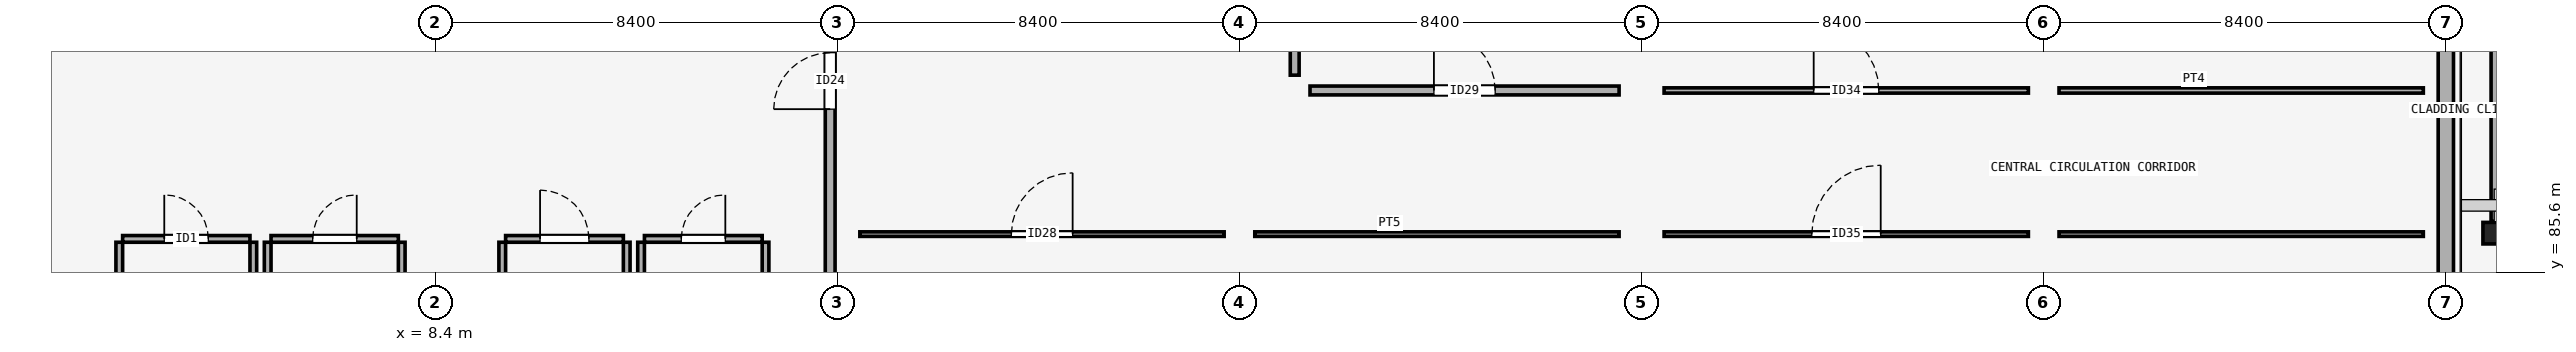
"""IFC4 building model, lengths in metres.
Left out: names, types, materials, properties, quantities, classifications, styles, units other than length and angle.
Written with IfcOpenShell. Run it as: python <this file> out.ifc"""

import sys

from ifc_helpers import new_model, si_unit, direction, frame, frame_2d, origin, origin_2d, place, context, subcontext, project, spatial, rectangle, extrude, element, fill, save


model = new_model("IFC4")
c1 = context("Model", 3, precision=1e-05, world=origin(), true_north=direction((0.0, 1.0)))
c2 = subcontext(c1, "Body", "Model", "MODEL_VIEW")
j1 = project(units=[si_unit("LENGTHUNIT", "METRE"), si_unit("PLANEANGLEUNIT", "RADIAN")], contexts=[c1])
p1 = place(None, origin())
s1 = spatial("IfcSite", under=j1, at=p1, CompositionType="ELEMENT")
p2 = place(p1, origin())
s2 = spatial("IfcBuilding", under=s1, at=p2, CompositionType="ELEMENT")
p3 = place(p2, origin())
s3 = spatial("IfcBuildingStorey", under=s2, at=p3, CompositionType="ELEMENT", Elevation=0.0)
p4 = place(p3, frame((51.45, 86.42, 0.0), z_axis=(0.0, 0.0, 1.0), x_axis=(0.0, 1.0, 0.0)))
e1 = element("IfcColumn", 1, at=p4, inside=s3, PredefinedType="PILASTER", context=c2, shape_type="SweptSolid", body=[
    extrude(rectangle(XDim=0.45, YDim=0.55, at=origin_2d()), origin(), (0.0, 0.0, 1.0), 5.4),
])
p5 = place(p3, frame((50.4, 85.225, 0.0), z_axis=(0.0, 0.0, 1.0), x_axis=(0.0, 1.0, 0.0)))
e2 = element("IfcWall", 2, at=p5, inside=s3, PredefinedType="SOLIDWALL", context=c2, shape_type="SweptSolid", body=[
    extrude(rectangle(XDim=7.55, YDim=0.32, at=frame_2d((3.775, 0.0))), origin(), (0.0, 0.0, 1.0), 4.35),
])
p6 = place(p3, frame((51.45, 86.67, 4.78), z_axis=(0.0, 0.0, 1.0), x_axis=(0.0, 1.0, 0.0)))
e3 = element("IfcWall", 3, at=p6, inside=s3, PredefinedType="PARAPET", context=c2, shape_type="SweptSolid", body=[
    extrude(rectangle(XDim=4.66, YDim=0.21, at=frame_2d((2.33, 0.0))), origin(), (0.0, 0.0, 1.0), 0.12),
])
p7 = place(p3, frame((1.87, 86.3, 0.0), z_axis=(0.0, 0.0, 1.0), x_axis=(1.0, 0.0, 0.0)))
e4 = element("IfcWall", 4, at=p7, inside=s3, PredefinedType="PARTITIONING", context=c2, shape_type="SweptSolid", body=[
    extrude(rectangle(XDim=2.66, YDim=0.14, at=frame_2d((1.33, 0.0))), origin(), (0.0, 0.0, 1.0), 5.1),
])
p8 = place(p7, frame((0.87, 0.0, 0.0)))
e5 = element("IfcOpeningElement", 5, at=p8, cuts=e4, PredefinedType="OPENING", context=c2, shape_type="SweptSolid", body=[
    extrude(rectangle(XDim=0.92, YDim=2.12, at=frame_2d((0.46, 1.06))), frame((0.0, 0.08, 0.0), z_axis=(0.0, -1.0, 0.0), x_axis=(1.0, 0.0, 0.0)), (0.0, 0.0, 1.0), 0.16),
])
for number, where, z_axis, x_axis in (
    (6, (1.8, 83.87, 0.0), (0.0, 0.0, 1.0), (0.0, 1.0, 0.0)),
    (7, (4.6, 83.87, 0.0), (0.0, 0.0, 1.0), (0.0, 1.0, 0.0)),
):
    element("IfcWall", number, at=place(p3, frame(where, z_axis=z_axis, x_axis=x_axis)), inside=s3, PredefinedType="PARTITIONING", context=c2, shape_type="SweptSolid", body=[
        extrude(rectangle(XDim=2.36, YDim=0.14, at=frame_2d((1.18, 0.0))), origin(), (0.0, 0.0, 1.0), 4.35),
    ])
p9 = place(p3, frame((4.97, 86.3, 0.0), z_axis=(0.0, 0.0, 1.0), x_axis=(1.0, 0.0, 0.0)))
e8 = element("IfcWall", 8, at=p9, inside=s3, PredefinedType="PARTITIONING", context=c2, shape_type="SweptSolid", body=[
    extrude(rectangle(XDim=2.66, YDim=0.14, at=frame_2d((1.33, 0.0))), origin(), (0.0, 0.0, 1.0), 5.1),
])
p10 = place(p9, frame((0.87, 0.0, 0.0)))
e9 = element("IfcOpeningElement", 9, at=p10, cuts=e8, PredefinedType="OPENING", context=c2, shape_type="SweptSolid", body=[
    extrude(rectangle(XDim=0.92, YDim=2.12, at=frame_2d((0.46, 1.06))), frame((0.0, 0.08, 0.0), z_axis=(0.0, -1.0, 0.0), x_axis=(1.0, 0.0, 0.0)), (0.0, 0.0, 1.0), 0.16),
])
for number, where, z_axis, x_axis in (
    (10, (4.9, 83.87, 0.0), (0.0, 0.0, 1.0), (0.0, 1.0, 0.0)),
    (11, (7.7, 83.87, 0.0), (0.0, 0.0, 1.0), (0.0, 1.0, 0.0)),
):
    element("IfcWall", number, at=place(p3, frame(where, z_axis=z_axis, x_axis=x_axis)), inside=s3, PredefinedType="PARTITIONING", context=c2, shape_type="SweptSolid", body=[
        extrude(rectangle(XDim=2.36, YDim=0.14, at=frame_2d((1.18, 0.0))), origin(), (0.0, 0.0, 1.0), 4.35),
    ])
p11 = place(p3, frame((9.87, 86.3, 0.0), z_axis=(0.0, 0.0, 1.0), x_axis=(1.0, 0.0, 0.0)))
e12 = element("IfcWall", 12, at=p11, inside=s3, PredefinedType="PARTITIONING", context=c2, shape_type="SweptSolid", body=[
    extrude(rectangle(XDim=2.46, YDim=0.14, at=frame_2d((1.23, 0.0))), origin(), (0.0, 0.0, 1.0), 5.1),
])
p12 = place(p11, frame((0.72, 0.0, 0.0)))
e13 = element("IfcOpeningElement", 13, at=p12, cuts=e12, PredefinedType="OPENING", context=c2, shape_type="SweptSolid", body=[
    extrude(rectangle(XDim=1.02, YDim=2.15, at=frame_2d((0.51, 1.075))), frame((0.0, 0.08, 0.0), z_axis=(0.0, -1.0, 0.0), x_axis=(1.0, 0.0, 0.0)), (0.0, 0.0, 1.0), 0.16),
])
for number, where, z_axis, x_axis in (
    (14, (9.8, 83.87, 0.0), (0.0, 0.0, 1.0), (0.0, 1.0, 0.0)),
    (15, (12.4, 83.87, 0.0), (0.0, 0.0, 1.0), (0.0, 1.0, 0.0)),
):
    element("IfcWall", number, at=place(p3, frame(where, z_axis=z_axis, x_axis=x_axis)), inside=s3, PredefinedType="PARTITIONING", context=c2, shape_type="SweptSolid", body=[
        extrude(rectangle(XDim=2.36, YDim=0.14, at=frame_2d((1.18, 0.0))), origin(), (0.0, 0.0, 1.0), 4.35),
    ])
p13 = place(p3, frame((12.77, 86.3, 0.0), z_axis=(0.0, 0.0, 1.0), x_axis=(1.0, 0.0, 0.0)))
e16 = element("IfcWall", 16, at=p13, inside=s3, PredefinedType="PARTITIONING", context=c2, shape_type="SweptSolid", body=[
    extrude(rectangle(XDim=2.46, YDim=0.14, at=frame_2d((1.23, 0.0))), origin(), (0.0, 0.0, 1.0), 5.1),
])
p14 = place(p13, frame((0.77, 0.0, 0.0)))
e17 = element("IfcOpeningElement", 17, at=p14, cuts=e16, PredefinedType="OPENING", context=c2, shape_type="SweptSolid", body=[
    extrude(rectangle(XDim=0.92, YDim=2.12, at=frame_2d((0.46, 1.06))), frame((0.0, 0.08, 0.0), z_axis=(0.0, -1.0, 0.0), x_axis=(1.0, 0.0, 0.0)), (0.0, 0.0, 1.0), 0.16),
])
for number, where, z_axis, x_axis in (
    (18, (12.7, 83.87, 0.0), (0.0, 0.0, 1.0), (0.0, 1.0, 0.0)),
    (19, (15.3, 83.87, 0.0), (0.0, 0.0, 1.0), (0.0, 1.0, 0.0)),
):
    element("IfcWall", number, at=place(p3, frame(where, z_axis=z_axis, x_axis=x_axis)), inside=s3, PredefinedType="PARTITIONING", context=c2, shape_type="SweptSolid", body=[
        extrude(rectangle(XDim=2.36, YDim=0.14, at=frame_2d((1.18, 0.0))), origin(), (0.0, 0.0, 1.0), 4.35),
    ])
p15 = place(p3, frame((16.65, 83.67, 0.0), z_axis=(0.0, 0.0, 1.0), x_axis=(0.0, 1.0, 0.0)))
e20 = element("IfcWall", 20, at=p15, inside=s3, PredefinedType="PARTITIONING", context=c2, shape_type="SweptSolid", body=[
    extrude(rectangle(XDim=11.86, YDim=0.205, at=frame_2d((5.93, 0.0))), origin(), (0.0, 0.0, 1.0), 4.35),
])
p16 = place(p15, frame((5.34, 0.0, 0.0)))
e21 = element("IfcOpeningElement", 21, at=p16, cuts=e20, PredefinedType="OPENING", context=c2, shape_type="SweptSolid", body=[
    extrude(rectangle(XDim=1.18, YDim=2.22, at=frame_2d((0.59, 1.11))), frame((0.0, 0.113, 0.0), z_axis=(0.0, -1.0, 0.0), x_axis=(1.0, 0.0, 0.0)), (0.0, 0.0, 1.0), 0.225),
])
p17 = place(p3, frame((17.27, 86.4, 0.0), z_axis=(0.0, 0.0, 1.0), x_axis=(1.0, 0.0, 0.0)))
e22 = element("IfcWall", 22, at=p17, inside=s3, PredefinedType="PARTITIONING", context=c2, shape_type="SweptSolid", body=[
    extrude(rectangle(XDim=7.61, YDim=0.095, at=frame_2d((3.805, 0.0))), origin(), (0.0, 0.0, 1.0), 5.1),
])
p18 = place(p17, frame((3.165, 0.0, 0.0)))
e23 = element("IfcOpeningElement", 23, at=p18, cuts=e22, PredefinedType="OPENING", context=c2, shape_type="SweptSolid", body=[
    extrude(rectangle(XDim=1.28, YDim=2.22, at=frame_2d((0.64, 1.11))), frame((0.0, 0.057, 0.0), z_axis=(0.0, -1.0, 0.0), x_axis=(1.0, 0.0, 0.0)), (0.0, 0.0, 1.0), 0.115),
])
p19 = place(p3, frame((25.52, 86.4, 0.0), z_axis=(0.0, 0.0, 1.0), x_axis=(1.0, 0.0, 0.0)))
e24 = element("IfcWall", 24, at=p19, inside=s3, PredefinedType="PARTITIONING", context=c2, shape_type="SweptSolid", body=[
    extrude(rectangle(XDim=7.61, YDim=0.095, at=frame_2d((3.805, 0.0))), origin(), (0.0, 0.0, 1.0), 5.1),
])
p20 = place(p3, frame((26.674, 89.4, 0.0), z_axis=(0.0, 0.0, 1.0), x_axis=(1.0, 0.0, 0.0)))
e25 = element("IfcWall", 25, at=p20, inside=s3, PredefinedType="PARTITIONING", context=c2, shape_type="SweptSolid", body=[
    extrude(rectangle(XDim=6.456, YDim=0.185, at=frame_2d((3.228, 0.0))), origin(), (0.0, 0.0, 1.0), 5.1),
])
p21 = place(p20, frame((2.588, 0.0, 0.0)))
e26 = element("IfcOpeningElement", 26, at=p21, cuts=e25, PredefinedType="OPENING", context=c2, shape_type="SweptSolid", body=[
    extrude(rectangle(XDim=1.28, YDim=2.34, at=frame_2d((0.64, 1.17))), frame((0.0, 0.103, 0.0), z_axis=(0.0, -1.0, 0.0), x_axis=(1.0, 0.0, 0.0)), (0.0, 0.0, 1.0), 0.205),
])
p22 = place(p3, frame((26.354, 89.72, 0.0), z_axis=(0.0, 0.0, 1.0), x_axis=(0.0, 1.0, 0.0)))
e27 = element("IfcWall", 27, at=p22, inside=s3, PredefinedType="PARTITIONING", context=c2, shape_type="SweptSolid", body=[
    extrude(rectangle(XDim=5.81, YDim=0.185, at=frame_2d((2.905, 0.0))), origin(), (0.0, 0.0, 1.0), 4.4),
])
p23 = place(p3, frame((34.07, 89.4, 0.0), z_axis=(0.0, 0.0, 1.0), x_axis=(1.0, 0.0, 0.0)))
e28 = element("IfcWall", 28, at=p23, inside=s3, PredefinedType="PARTITIONING", context=c2, shape_type="SweptSolid", body=[
    extrude(rectangle(XDim=7.61, YDim=0.11, at=frame_2d((3.805, 0.0))), origin(), (0.0, 0.0, 1.0), 5.1),
])
p24 = place(p23, frame((3.125, 0.0, 0.0)))
e29 = element("IfcOpeningElement", 29, at=p24, cuts=e28, PredefinedType="OPENING", context=c2, shape_type="SweptSolid", body=[
    extrude(rectangle(XDim=1.36, YDim=2.46, at=frame_2d((0.68, 1.23))), frame((0.0, 0.065, 0.0), z_axis=(0.0, -1.0, 0.0), x_axis=(1.0, 0.0, 0.0)), (0.0, 0.0, 1.0), 0.13),
])
p25 = place(p3, frame((42.32, 89.4, 0.0), z_axis=(0.0, 0.0, 1.0), x_axis=(1.0, 0.0, 0.0)))
e30 = element("IfcWall", 30, at=p25, inside=s3, PredefinedType="PARTITIONING", context=c2, shape_type="SweptSolid", body=[
    extrude(rectangle(XDim=7.61, YDim=0.11, at=frame_2d((3.805, 0.0))), origin(), (0.0, 0.0, 1.0), 5.1),
])
p26 = place(p3, frame((34.07, 86.4, 0.0), z_axis=(0.0, 0.0, 1.0), x_axis=(1.0, 0.0, 0.0)))
e31 = element("IfcWall", 31, at=p26, inside=s3, PredefinedType="PARTITIONING", context=c2, shape_type="SweptSolid", body=[
    extrude(rectangle(XDim=7.61, YDim=0.095, at=frame_2d((3.805, 0.0))), origin(), (0.0, 0.0, 1.0), 5.1),
])
p27 = place(p26, frame((3.085, 0.0, 0.0)))
e32 = element("IfcOpeningElement", 32, at=p27, cuts=e31, PredefinedType="OPENING", context=c2, shape_type="SweptSolid", body=[
    extrude(rectangle(XDim=1.44, YDim=2.1, at=frame_2d((0.72, 1.05))), frame((0.0, 0.057, 0.0), z_axis=(0.0, -1.0, 0.0), x_axis=(1.0, 0.0, 0.0)), (0.0, 0.0, 1.0), 0.115),
])
p28 = place(p3, frame((42.32, 86.4, 0.0), z_axis=(0.0, 0.0, 1.0), x_axis=(1.0, 0.0, 0.0)))
e33 = element("IfcWall", 33, at=p28, inside=s3, PredefinedType="PARTITIONING", context=c2, shape_type="SweptSolid", body=[
    extrude(rectangle(XDim=7.61, YDim=0.095, at=frame_2d((3.805, 0.0))), origin(), (0.0, 0.0, 1.0), 5.1),
])
p29 = place(p8, origin())
e34 = element("IfcDoor", 34, at=p29, inside=s3, OperationType="SINGLE_SWING_LEFT", PredefinedType="DOOR", context=c2, shape_type="SweptSolid", body=[
    extrude(rectangle(XDim=0.92, YDim=2.12, at=frame_2d((0.46, 1.06))), frame((0.0, 0.025, 0.0), z_axis=(0.0, -1.0, 0.0), x_axis=(1.0, 0.0, 0.0)), (0.0, 0.0, 1.0), 0.05),
])
fill(e5, e34)
p30 = place(p10, origin())
e35 = element("IfcDoor", 35, at=p30, inside=s3, OperationType="SINGLE_SWING_RIGHT", PredefinedType="DOOR", context=c2, shape_type="SweptSolid", body=[
    extrude(rectangle(XDim=0.92, YDim=2.12, at=frame_2d((0.46, 1.06))), frame((0.0, 0.025, 0.0), z_axis=(0.0, -1.0, 0.0), x_axis=(1.0, 0.0, 0.0)), (0.0, 0.0, 1.0), 0.05),
])
fill(e9, e35)
p31 = place(p12, origin())
e36 = element("IfcDoor", 36, at=p31, inside=s3, OperationType="SINGLE_SWING_LEFT", PredefinedType="DOOR", context=c2, shape_type="SweptSolid", body=[
    extrude(rectangle(XDim=1.02, YDim=2.15, at=frame_2d((0.51, 1.075))), frame((0.0, 0.025, 0.0), z_axis=(0.0, -1.0, 0.0), x_axis=(1.0, 0.0, 0.0)), (0.0, 0.0, 1.0), 0.05),
])
fill(e13, e36)
p32 = place(p14, origin())
e37 = element("IfcDoor", 37, at=p32, inside=s3, OperationType="SINGLE_SWING_RIGHT", PredefinedType="DOOR", context=c2, shape_type="SweptSolid", body=[
    extrude(rectangle(XDim=0.92, YDim=2.12, at=frame_2d((0.46, 1.06))), frame((0.0, 0.025, 0.0), z_axis=(0.0, -1.0, 0.0), x_axis=(1.0, 0.0, 0.0)), (0.0, 0.0, 1.0), 0.05),
])
fill(e17, e37)
p33 = place(p16, origin())
e38 = element("IfcDoor", 38, at=p33, inside=s3, OperationType="SINGLE_SWING_LEFT", PredefinedType="DOOR", context=c2, shape_type="SweptSolid", body=[
    extrude(rectangle(XDim=1.18, YDim=2.22, at=frame_2d((0.59, 1.11))), frame((0.0, 0.025, 0.0), z_axis=(0.0, -1.0, 0.0), x_axis=(1.0, 0.0, 0.0)), (0.0, 0.0, 1.0), 0.05),
])
fill(e21, e38)
p34 = place(p18, origin())
e39 = element("IfcDoor", 39, at=p34, inside=s3, OperationType="SINGLE_SWING_RIGHT", PredefinedType="DOOR", context=c2, shape_type="SweptSolid", body=[
    extrude(rectangle(XDim=1.28, YDim=2.22, at=frame_2d((0.64, 1.11))), frame((0.0, 0.025, 0.0), z_axis=(0.0, -1.0, 0.0), x_axis=(1.0, 0.0, 0.0)), (0.0, 0.0, 1.0), 0.05),
])
fill(e23, e39)
p35 = place(p21, origin())
e40 = element("IfcDoor", 40, at=p35, inside=s3, OperationType="SINGLE_SWING_LEFT", PredefinedType="DOOR", context=c2, shape_type="SweptSolid", body=[
    extrude(rectangle(XDim=1.28, YDim=2.34, at=frame_2d((0.64, 1.17))), frame((0.0, 0.025, 0.0), z_axis=(0.0, -1.0, 0.0), x_axis=(1.0, 0.0, 0.0)), (0.0, 0.0, 1.0), 0.05),
])
fill(e26, e40)
p36 = place(p24, origin())
e41 = element("IfcDoor", 41, at=p36, inside=s3, OperationType="SINGLE_SWING_LEFT", PredefinedType="DOOR", context=c2, shape_type="SweptSolid", body=[
    extrude(rectangle(XDim=1.36, YDim=2.46, at=frame_2d((0.68, 1.23))), frame((0.0, 0.025, 0.0), z_axis=(0.0, -1.0, 0.0), x_axis=(1.0, 0.0, 0.0)), (0.0, 0.0, 1.0), 0.05),
])
fill(e29, e41)
p37 = place(p27, origin())
e42 = element("IfcDoor", 42, at=p37, inside=s3, OperationType="SINGLE_SWING_RIGHT", PredefinedType="DOOR", context=c2, shape_type="SweptSolid", body=[
    extrude(rectangle(XDim=1.44, YDim=2.1, at=frame_2d((0.72, 1.05))), frame((0.0, 0.025, 0.0), z_axis=(0.0, -1.0, 0.0), x_axis=(1.0, 0.0, 0.0)), (0.0, 0.0, 1.0), 0.05),
])
fill(e32, e42)
save(model, sys.argv[1])
